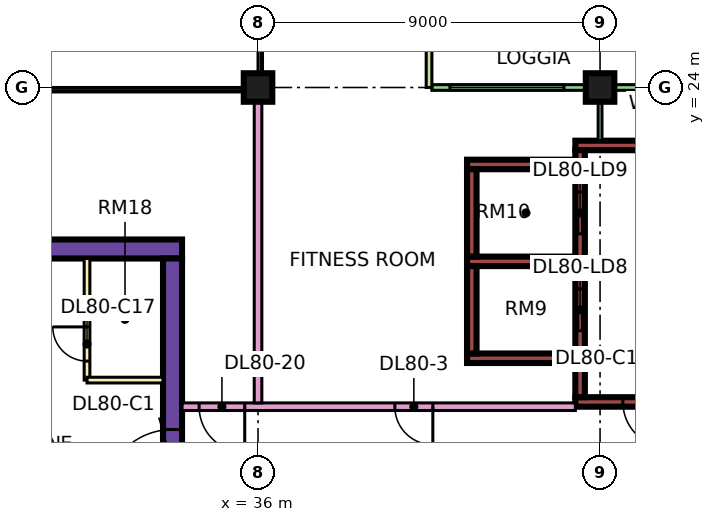
"""IFC4 building model, lengths in metres.
Left out: names, types, materials, properties, quantities, classifications, styles, units other than length and angle.
Written with IfcOpenShell. Run it as: python <this file> out.ifc"""

import sys

from ifc_helpers import new_model, si_unit, direction, frame, frame_2d, origin, origin_2d, place, context, subcontext, project, spatial, rectangle, extrude, element, fill, save


model = new_model("IFC4")
c1 = context("Model", 3, precision=1e-05, world=origin(), true_north=direction((0.0, 1.0)))
c2 = subcontext(c1, "Body", "Model", "MODEL_VIEW")
j1 = project(units=[si_unit("LENGTHUNIT", "METRE"), si_unit("PLANEANGLEUNIT", "RADIAN")], contexts=[c1])
p1 = place(None, origin())
s1 = spatial("IfcSite", under=j1, at=p1, CompositionType="ELEMENT")
p2 = place(p1, origin())
s2 = spatial("IfcBuilding", under=s1, at=p2, CompositionType="ELEMENT")
p3 = place(p2, frame((0.0, 0.0, 346.4)))
s3 = spatial("IfcBuildingStorey", under=s2, at=p3, CompositionType="ELEMENT", Elevation=346.4)
for number, where, z_axis, x_axis in (
    (1, (36.0, 24.0, 0.0), (0.0, 0.0, 1.0), (1.0, 0.0, 0.0)),
    (2, (45.0, 24.0, 0.0), (0.0, 0.0, 1.0), (1.0, 0.0, 0.0)),
):
    element("IfcColumn", number, at=place(p3, frame(where, z_axis=z_axis, x_axis=x_axis)), inside=s3, PredefinedType="COLUMN", context=c2, shape_type="SweptSolid", body=[
        extrude(rectangle(XDim=0.75, YDim=0.75, at=origin_2d()), origin(), (0.0, 0.0, 1.0), 3.75),
    ])
p4 = place(p3, frame((9.0, 19.75, 0.0), z_axis=(0.0, 0.0, 1.0), x_axis=(1.0, 0.0, 0.0)))
e3 = element("IfcWall", 3, at=p4, inside=s3, PredefinedType="SHEAR", context=c2, shape_type="SweptSolid", body=[
    extrude(rectangle(XDim=25.0, YDim=0.5, at=frame_2d((12.5, 0.0))), origin(), (0.0, 0.0, 1.0), 3.75),
])
p5 = place(p4, frame((19.1, 0.0, 0.0)))
e4 = element("IfcOpeningElement", 4, at=p5, cuts=e3, PredefinedType="OPENING", context=c2, shape_type="SweptSolid", body=[
    extrude(rectangle(XDim=1.8, YDim=2.4, at=frame_2d((0.9, 1.2))), frame((0.0, 0.26, 0.0), z_axis=(0.0, -1.0, 0.0), x_axis=(1.0, 0.0, 0.0)), (0.0, 0.0, 1.0), 0.52),
])
p6 = place(p3, frame((33.75, 7.5, 0.0), z_axis=(0.0, 0.0, 1.0), x_axis=(0.0, 1.0, 0.0)))
e5 = element("IfcWall", 5, at=p6, inside=s3, PredefinedType="SHEAR", context=c2, shape_type="SweptSolid", body=[
    extrude(rectangle(XDim=12.0, YDim=0.5, at=frame_2d((6.0, 0.0))), origin(), (0.0, 0.0, 1.0), 3.75),
])
p7 = place(p6, frame((5.7, 0.0, 0.0)))
e6 = element("IfcOpeningElement", 6, at=p7, cuts=e5, PredefinedType="OPENING", context=c2, shape_type="SweptSolid", body=[
    extrude(rectangle(XDim=1.8, YDim=2.4, at=frame_2d((0.9, 1.2))), frame((0.0, 0.26, 0.0), z_axis=(0.0, -1.0, 0.0), x_axis=(1.0, 0.0, 0.0)), (0.0, 0.0, 1.0), 0.52),
])
p8 = place(p3, frame((44.35, 15.725, 0.0), z_axis=(0.0, 0.0, 1.0), x_axis=(1.0, 0.0, 0.0)))
e7 = element("IfcWall", 7, at=p8, inside=s3, PredefinedType="SHEAR", context=c2, shape_type="SweptSolid", body=[
    extrude(rectangle(XDim=3.425, YDim=0.25, at=frame_2d((1.712, 0.0))), origin(), (0.0, 0.0, 1.0), 3.75),
])
p9 = place(p8, frame((1.25, 0.0, 0.0)))
e8 = element("IfcOpeningElement", 8, at=p9, cuts=e7, PredefinedType="OPENING", context=c2, shape_type="SweptSolid", body=[
    extrude(rectangle(XDim=1.2, YDim=2.2, at=frame_2d((0.6, 1.1))), frame((0.0, 0.135, 0.0), z_axis=(0.0, -1.0, 0.0), x_axis=(1.0, 0.0, 0.0)), (0.0, 0.0, 1.0), 0.27),
])
p10 = place(p3, frame((44.35, 22.475, 0.0), z_axis=(0.0, 0.0, 1.0), x_axis=(1.0, 0.0, 0.0)))
e9 = element("IfcWall", 9, at=p10, inside=s3, PredefinedType="SHEAR", context=c2, shape_type="SweptSolid", body=[
    extrude(rectangle(XDim=3.425, YDim=0.25, at=frame_2d((1.712, 0.0))), origin(), (0.0, 0.0, 1.0), 3.75),
])
p11 = place(p3, frame((44.475, 15.85, 0.0), z_axis=(0.0, 0.0, 1.0), x_axis=(0.0, 1.0, 0.0)))
e10 = element("IfcWall", 10, at=p11, inside=s3, PredefinedType="SHEAR", context=c2, shape_type="SweptSolid", body=[
    extrude(rectangle(XDim=6.5, YDim=0.25, at=frame_2d((3.25, 0.0))), origin(), (0.0, 0.0, 1.0), 3.75),
])
p12 = place(p11, frame((1.75, 0.0, 0.0)))
e11 = element("IfcOpeningElement", 11, at=p12, cuts=e10, PredefinedType="OPENING", context=c2, shape_type="SweptSolid", body=[
    extrude(rectangle(XDim=1.1, YDim=2.2, at=frame_2d((0.55, 1.1))), frame((0.0, 0.135, 0.0), z_axis=(0.0, -1.0, 0.0), x_axis=(1.0, 0.0, 0.0)), (0.0, 0.0, 1.0), 0.27),
])
p13 = place(p11, frame((4.3, 0.0, 0.0)))
e12 = element("IfcOpeningElement", 12, at=p13, cuts=e10, PredefinedType="OPENING", context=c2, shape_type="SweptSolid", body=[
    extrude(rectangle(XDim=1.1, YDim=2.2, at=frame_2d((0.55, 1.1))), frame((0.0, 0.135, 0.0), z_axis=(0.0, -1.0, 0.0), x_axis=(1.0, 0.0, 0.0)), (0.0, 0.0, 1.0), 0.27),
])
for number, where, z_axis, x_axis in (
    (13, (41.5, 16.875, 0.0), (0.0, 0.0, 1.0), (1.0, 0.0, 0.0)),
    (14, (41.5, 19.425, 0.0), (0.0, 0.0, 1.0), (1.0, 0.0, 0.0)),
    (15, (41.5, 21.975, 0.0), (0.0, 0.0, 1.0), (1.0, 0.0, 0.0)),
):
    element("IfcWall", number, at=place(p3, frame(where, z_axis=z_axis, x_axis=x_axis)), inside=s3, PredefinedType="SHEAR", context=c2, shape_type="SweptSolid", body=[
        extrude(rectangle(XDim=2.85, YDim=0.25, at=frame_2d((1.425, 0.0))), origin(), (0.0, 0.0, 1.0), 3.75),
    ])
for number, where, z_axis, x_axis in (
    (16, (41.625, 17.0, 0.0), (0.0, 0.0, 1.0), (0.0, 1.0, 0.0)),
    (17, (41.625, 19.55, 0.0), (0.0, 0.0, 1.0), (0.0, 1.0, 0.0)),
):
    element("IfcWall", number, at=place(p3, frame(where, z_axis=z_axis, x_axis=x_axis)), inside=s3, PredefinedType="SHEAR", context=c2, shape_type="SweptSolid", body=[
        extrude(rectangle(XDim=2.3, YDim=0.25, at=frame_2d((1.15, 0.0))), origin(), (0.0, 0.0, 1.0), 3.75),
    ])
p14 = place(p3, frame((47.925, 24.0, 0.0), z_axis=(0.0, 0.0, 1.0), x_axis=(-1.0, 0.0, 0.0)))
e18 = element("IfcWall", 18, at=p14, inside=s3, PredefinedType="SOLIDWALL", context=c2, shape_type="SweptSolid", body=[
    extrude(rectangle(XDim=7.35, YDim=0.15, at=frame_2d((3.675, 0.0))), origin(), (0.0, 0.0, 1.0), 3.35),
])
p15 = place(p14, frame((0.625, 0.0, 0.45)))
e19 = element("IfcOpeningElement", 19, at=p15, cuts=e18, PredefinedType="OPENING", context=c2, shape_type="SweptSolid", body=[
    extrude(rectangle(XDim=1.2, YDim=2.4, at=frame_2d((0.6, 1.2))), frame((0.0, 0.085, 0.0), z_axis=(0.0, -1.0, 0.0), x_axis=(1.0, 0.0, 0.0)), (0.0, 0.0, 1.0), 0.17),
])
p16 = place(p14, frame((3.875, 0.0, 0.45)))
e20 = element("IfcOpeningElement", 20, at=p16, cuts=e18, PredefinedType="OPENING", context=c2, shape_type="SweptSolid", body=[
    extrude(rectangle(XDim=3.0, YDim=2.4, at=frame_2d((1.5, 1.2))), frame((0.0, 0.085, 0.0), z_axis=(0.0, -1.0, 0.0), x_axis=(1.0, 0.0, 0.0)), (0.0, 0.0, 1.0), 0.17),
])
p17 = place(p3, frame((40.5, 25.5, 0.0), z_axis=(0.0, 0.0, 1.0), x_axis=(0.0, -1.0, 0.0)))
e21 = element("IfcWall", 21, at=p17, inside=s3, PredefinedType="SOLIDWALL", context=c2, shape_type="SweptSolid", body=[
    extrude(rectangle(XDim=1.5, YDim=0.15, at=frame_2d((0.75, 0.0))), origin(), (0.0, 0.0, 1.0), 3.35),
])
p18 = place(p3, frame((31.5, 16.3, 0.0), z_axis=(0.0, 0.0, 1.0), x_axis=(0.0, 1.0, 0.0)))
e22 = element("IfcWall", 22, at=p18, inside=s3, PredefinedType="PARTITIONING", context=c2, shape_type="SweptSolid", body=[
    extrude(rectangle(XDim=3.2, YDim=0.15, at=frame_2d((1.6, 0.0))), origin(), (0.0, 0.0, 1.0), 3.35),
])
p19 = place(p18, frame((0.5, 0.0, 0.0)))
e23 = element("IfcOpeningElement", 23, at=p19, cuts=e22, PredefinedType="OPENING", context=c2, shape_type="SweptSolid", body=[
    extrude(rectangle(XDim=0.9, YDim=2.1, at=frame_2d((0.45, 1.05))), frame((0.0, 0.085, 0.0), z_axis=(0.0, -1.0, 0.0), x_axis=(1.0, 0.0, 0.0)), (0.0, 0.0, 1.0), 0.17),
])
p20 = place(p3, frame((31.5, 16.3, 0.0), z_axis=(0.0, 0.0, 1.0), x_axis=(1.0, 0.0, 0.0)))
e24 = element("IfcWall", 24, at=p20, inside=s3, PredefinedType="PARTITIONING", context=c2, shape_type="SweptSolid", body=[
    extrude(rectangle(XDim=2.0, YDim=0.15, at=frame_2d((1.0, 0.0))), origin(), (0.0, 0.0, 1.0), 3.35),
])
p21 = place(p3, frame((34.0, 15.6, 0.0), z_axis=(0.0, 0.0, 1.0), x_axis=(1.0, 0.0, 0.0)))
e25 = element("IfcWall", 25, at=p21, inside=s3, PredefinedType="PARTITIONING", context=c2, shape_type="SweptSolid", body=[
    extrude(rectangle(XDim=10.35, YDim=0.2, at=frame_2d((5.175, 0.0))), origin(), (0.0, 0.0, 1.0), 3.35),
])
p22 = place(p21, frame((5.6, 0.0, 0.0)))
e26 = element("IfcOpeningElement", 26, at=p22, cuts=e25, PredefinedType="OPENING", context=c2, shape_type="SweptSolid", body=[
    extrude(rectangle(XDim=1.0, YDim=2.1, at=frame_2d((0.5, 1.05))), frame((0.0, 0.11, 0.0), z_axis=(0.0, -1.0, 0.0), x_axis=(1.0, 0.0, 0.0)), (0.0, 0.0, 1.0), 0.22),
])
p23 = place(p21, frame((0.45, 0.0, 0.0)))
e27 = element("IfcOpeningElement", 27, at=p23, cuts=e25, PredefinedType="OPENING", context=c2, shape_type="SweptSolid", body=[
    extrude(rectangle(XDim=1.2, YDim=2.1, at=frame_2d((0.6, 1.05))), frame((0.0, 0.11, 0.0), z_axis=(0.0, -1.0, 0.0), x_axis=(1.0, 0.0, 0.0)), (0.0, 0.0, 1.0), 0.22),
])
p24 = place(p3, frame((36.0, 15.7, 0.0), z_axis=(0.0, 0.0, 1.0), x_axis=(0.0, 1.0, 0.0)))
e28 = element("IfcWall", 28, at=p24, inside=s3, PredefinedType="PARTITIONING", context=c2, shape_type="SweptSolid", body=[
    extrude(rectangle(XDim=8.3, YDim=0.2, at=frame_2d((4.15, 0.0))), origin(), (0.0, 0.0, 1.0), 3.35),
])
p25 = place(p3, frame((45.0, 22.6, 0.0), z_axis=(0.0, 0.0, 1.0), x_axis=(0.0, 1.0, 0.0)))
e29 = element("IfcWall", 29, at=p25, inside=s3, PredefinedType="PARTITIONING", context=c2, shape_type="SweptSolid", body=[
    extrude(rectangle(XDim=1.326, YDim=0.1, at=frame_2d((0.663, 0.0))), origin(), (0.0, 0.0, 1.0), 3.35),
])
p26 = place(p16, origin())
e30 = element("IfcWindow", 30, at=p26, inside=s3, PartitioningType="SINGLE_PANEL", PredefinedType="WINDOW", context=c2, shape_type="SweptSolid", body=[
    extrude(rectangle(XDim=3.0, YDim=2.4, at=frame_2d((1.5, 1.2))), frame((0.0, 0.03, 0.0), z_axis=(0.0, -1.0, 0.0), x_axis=(1.0, 0.0, 0.0)), (0.0, 0.0, 1.0), 0.06),
])
fill(e20, e30)
p27 = place(p7, origin())
e31 = element("IfcDoor", 31, at=p27, inside=s3, OperationType="DOUBLE_DOOR_SINGLE_SWING", PredefinedType="DOOR", context=c2, shape_type="SweptSolid", body=[
    extrude(rectangle(XDim=1.8, YDim=2.4, at=frame_2d((0.9, 1.2))), frame((0.0, 0.025, 0.0), z_axis=(0.0, -1.0, 0.0), x_axis=(1.0, 0.0, 0.0)), (0.0, 0.0, 1.0), 0.05),
])
fill(e6, e31)
p28 = place(p9, origin())
e32 = element("IfcDoor", 32, at=p28, inside=s3, OperationType="SINGLE_SWING_RIGHT", PredefinedType="DOOR", context=c2, shape_type="SweptSolid", body=[
    extrude(rectangle(XDim=1.2, YDim=2.2, at=frame_2d((0.6, 1.1))), frame((0.0, 0.025, 0.0), z_axis=(0.0, -1.0, 0.0), x_axis=(1.0, 0.0, 0.0)), (0.0, 0.0, 1.0), 0.05),
])
fill(e8, e32)
p29 = place(p12, origin())
e33 = element("IfcDoor", 33, at=p29, inside=s3, OperationType="DOUBLE_DOOR_SLIDING", PredefinedType="DOOR", context=c2, shape_type="SweptSolid", body=[
    extrude(rectangle(XDim=1.1, YDim=2.2, at=frame_2d((0.55, 1.1))), frame((0.0, 0.025, 0.0), z_axis=(0.0, -1.0, 0.0), x_axis=(1.0, 0.0, 0.0)), (0.0, 0.0, 1.0), 0.05),
])
fill(e11, e33)
p30 = place(p13, origin())
e34 = element("IfcDoor", 34, at=p30, inside=s3, OperationType="DOUBLE_DOOR_SLIDING", PredefinedType="DOOR", context=c2, shape_type="SweptSolid", body=[
    extrude(rectangle(XDim=1.1, YDim=2.2, at=frame_2d((0.55, 1.1))), frame((0.0, 0.025, 0.0), z_axis=(0.0, -1.0, 0.0), x_axis=(1.0, 0.0, 0.0)), (0.0, 0.0, 1.0), 0.05),
])
fill(e12, e34)
p31 = place(p19, frame((0.9, 0.0, 0.0), z_axis=(0.0, 0.0, 1.0), x_axis=(-1.0, 0.0, 0.0)))
e35 = element("IfcDoor", 35, at=p31, inside=s3, OperationType="SINGLE_SWING_RIGHT", PredefinedType="DOOR", context=c2, shape_type="SweptSolid", body=[
    extrude(rectangle(XDim=0.9, YDim=2.1, at=frame_2d((0.45, 1.05))), frame((0.0, 0.025, 0.0), z_axis=(0.0, -1.0, 0.0), x_axis=(1.0, 0.0, 0.0)), (0.0, 0.0, 1.0), 0.05),
])
fill(e23, e35)
p32 = place(p22, origin())
e36 = element("IfcDoor", 36, at=p32, inside=s3, OperationType="SINGLE_SWING_RIGHT", PredefinedType="DOOR", context=c2, shape_type="SweptSolid", body=[
    extrude(rectangle(XDim=1.0, YDim=2.1, at=frame_2d((0.5, 1.05))), frame((0.0, 0.025, 0.0), z_axis=(0.0, -1.0, 0.0), x_axis=(1.0, 0.0, 0.0)), (0.0, 0.0, 1.0), 0.05),
])
fill(e26, e36)
p33 = place(p23, origin())
e37 = element("IfcDoor", 37, at=p33, inside=s3, OperationType="SINGLE_SWING_RIGHT", PredefinedType="DOOR", context=c2, shape_type="SweptSolid", body=[
    extrude(rectangle(XDim=1.2, YDim=2.1, at=frame_2d((0.6, 1.05))), frame((0.0, 0.025, 0.0), z_axis=(0.0, -1.0, 0.0), x_axis=(1.0, 0.0, 0.0)), (0.0, 0.0, 1.0), 0.05),
])
fill(e27, e37)
save(model, sys.argv[1])
